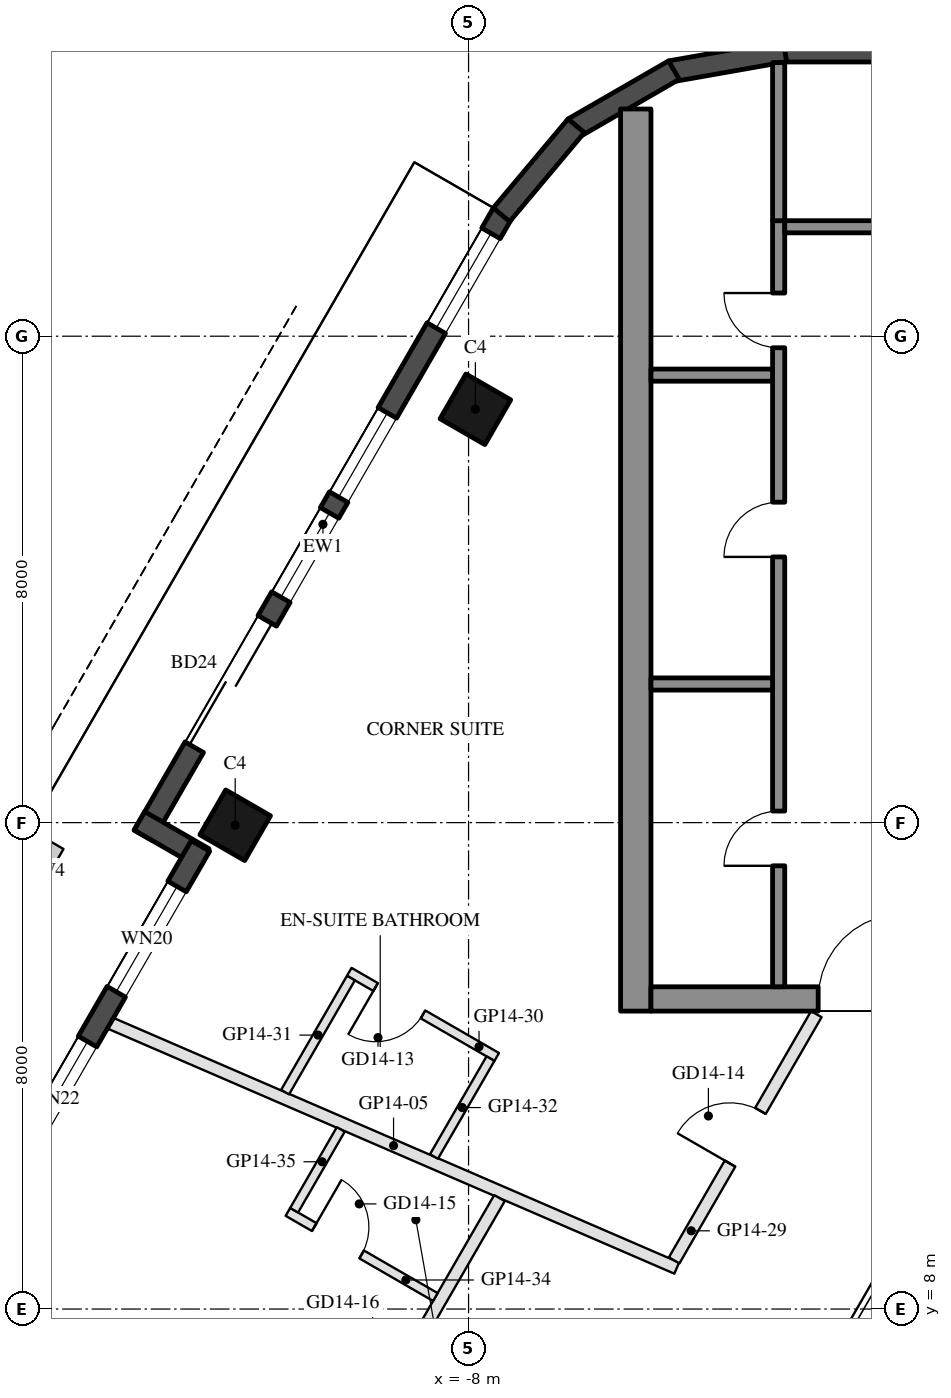
"""IFC4 building model, lengths in metres.
Left out: names, types, materials, properties, quantities, classifications, styles, units other than length and angle.
Written with IfcOpenShell. Run it as: python <this file> out.ifc"""

import sys

from ifc_helpers import new_model, si_unit, direction, frame, frame_2d, origin, origin_2d, place, context, subcontext, project, spatial, rectangle, hollow_rectangle, extrude, element, fill, save


model = new_model("IFC4")
c1 = context("Model", 3, precision=1e-05, world=origin(), true_north=direction((0.0, 1.0)))
c2 = subcontext(c1, "Body", "Model", "MODEL_VIEW")
j1 = project(units=[si_unit("LENGTHUNIT", "METRE"), si_unit("PLANEANGLEUNIT", "RADIAN")], contexts=[c1])
p1 = place(None, origin())
s1 = spatial("IfcSite", under=j1, at=p1, CompositionType="ELEMENT")
p2 = place(p1, origin())
s2 = spatial("IfcBuilding", under=s1, at=p2, CompositionType="ELEMENT")
p3 = place(p2, frame((0.0, 0.0, 165.1)))
s3 = spatial("IfcBuildingStorey", under=s2, at=p3, CompositionType="ELEMENT", Elevation=165.1)
for number, where, z_axis, x_axis in (
    (1, (-7.888, 22.798, 0.0), (0.0, 0.0, 1.0), (0.5, 0.866, 0.0)),
    (2, (-11.838, 15.957, 0.0), (0.0, 0.0, 1.0), (0.5, 0.866, 0.0)),
):
    element("IfcColumn", number, at=place(p3, frame(where, z_axis=z_axis, x_axis=x_axis)), inside=s3, PredefinedType="COLUMN", context=c2, shape_type="SweptSolid", body=[
        extrude(hollow_rectangle(XDim=0.85, YDim=0.85, WallThickness=0.04, at=origin_2d()), origin(), (0.0, 0.0, 1.0), 3.7),
    ])
p4 = place(p3, frame((-7.441, 26.022, 0.0), z_axis=(0.0, 0.0, 1.0), x_axis=(-0.499992533062, -0.86602971478, 0.0)))
e3 = element("IfcWall", 3, at=p4, inside=s3, PredefinedType="SOLIDWALL", context=c2, shape_type="SweptSolid", body=[
    extrude(rectangle(XDim=11.816, YDim=0.35, at=frame_2d((5.908, 0.0))), origin(), (0.0, 0.0, 1.0), 3.55),
])
p5 = place(p4, frame((0.381, 0.0, 0.3)))
e4 = element("IfcOpeningElement", 4, at=p5, cuts=e3, PredefinedType="OPENING", context=c2, shape_type="SweptSolid", body=[
    extrude(rectangle(XDim=1.8, YDim=2.65, at=frame_2d((0.9, 1.325))), frame((0.0, 0.185, 0.0), z_axis=(0.0, -1.0, 0.0), x_axis=(1.0, 0.0, 0.0)), (0.0, 0.0, 1.0), 0.37),
])
p6 = place(p4, frame((7.74, 0.0, 0.0)))
e5 = element("IfcOpeningElement", 5, at=p6, cuts=e3, PredefinedType="OPENING", context=c2, shape_type="SweptSolid", body=[
    extrude(rectangle(XDim=2.4, YDim=2.4, at=frame_2d((1.2, 1.2))), frame((0.0, 0.185, 0.0), z_axis=(0.0, -1.0, 0.0), x_axis=(1.0, 0.0, 0.0)), (0.0, 0.0, 1.0), 0.37),
])
p7 = place(p4, frame((3.791, 0.0, 0.3)))
e6 = element("IfcOpeningElement", 6, at=p7, cuts=e3, PredefinedType="OPENING", context=c2, shape_type="SweptSolid", body=[
    extrude(rectangle(XDim=1.6, YDim=2.65, at=frame_2d((0.8, 1.325))), frame((0.0, 0.185, 0.0), z_axis=(0.0, -1.0, 0.0), x_axis=(1.0, 0.0, 0.0)), (0.0, 0.0, 1.0), 0.37),
])
p8 = place(p4, frame((5.691, 0.0, 0.3)))
e7 = element("IfcOpeningElement", 7, at=p8, cuts=e3, PredefinedType="OPENING", context=c2, shape_type="SweptSolid", body=[
    extrude(rectangle(XDim=1.6, YDim=2.65, at=frame_2d((0.8, 1.325))), frame((0.0, 0.185, 0.0), z_axis=(0.0, -1.0, 0.0), x_axis=(1.0, 0.0, 0.0)), (0.0, 0.0, 1.0), 0.37),
])
p9 = place(p3, frame((-13.413, 16.029, 0.0), z_axis=(0.0, 0.0, 1.0), x_axis=(0.866005645448, -0.500034220881, 0.0)))
e8 = element("IfcWall", 8, at=p9, inside=s3, PredefinedType="SOLIDWALL", context=c2, shape_type="SweptSolid", body=[
    extrude(rectangle(XDim=1.22, YDim=0.35, at=frame_2d((0.61, 0.0))), origin(), (0.0, 0.0, 1.0), 3.55),
])
p10 = place(p3, frame((-12.409, 15.617, 0.0), z_axis=(0.0, 0.0, 1.0), x_axis=(-0.500003597184, -0.866023326939, 0.0)))
e9 = element("IfcWall", 9, at=p10, inside=s3, PredefinedType="SOLIDWALL", context=c2, shape_type="SweptSolid", body=[
    extrude(rectangle(XDim=6.74, YDim=0.35, at=frame_2d((3.37, 0.0))), origin(), (0.0, 0.0, 1.0), 3.55),
])
p11 = place(p10, frame((0.77, 0.0, 0.3)))
e10 = element("IfcOpeningElement", 10, at=p11, cuts=e9, PredefinedType="OPENING", context=c2, shape_type="SweptSolid", body=[
    extrude(rectangle(XDim=2.0, YDim=2.65, at=frame_2d((1.0, 1.325))), frame((0.0, 0.185, 0.0), z_axis=(0.0, -1.0, 0.0), x_axis=(1.0, 0.0, 0.0)), (0.0, 0.0, 1.0), 0.37),
])
p12 = place(p10, frame((3.715, 0.0, 0.3)))
e11 = element("IfcOpeningElement", 11, at=p12, cuts=e9, PredefinedType="OPENING", context=c2, shape_type="SweptSolid", body=[
    extrude(rectangle(XDim=2.2, YDim=2.65, at=frame_2d((1.1, 1.325))), frame((0.0, 0.185, 0.0), z_axis=(0.0, -1.0, 0.0), x_axis=(1.0, 0.0, 0.0)), (0.0, 0.0, 1.0), 0.37),
])
p13 = place(p3, frame((2.829, 28.685, 0.0), z_axis=(0.0, 0.0, 1.0), x_axis=(-1.0, 0.0, 0.0)))
e12 = element("IfcWall", 12, at=p13, inside=s3, PredefinedType="SOLIDWALL", context=c2, shape_type="SweptSolid", body=[
    extrude(rectangle(XDim=5.658, YDim=0.35, at=frame_2d((2.829, 0.0))), origin(), (0.0, 0.0, 1.0), 3.55),
])
for number, where, z_axis, x_axis in (
    (13, (-2.799, 28.688, 0.0), (0.0, 0.0, 1.0), (-0.985, -0.174, 0.0)),
    (14, (-4.623, 28.377, 0.0), (0.0, 0.0, 1.0), (-0.866, -0.5, 0.0)),
):
    element("IfcWall", number, at=place(p3, frame(where, z_axis=z_axis, x_axis=x_axis)), inside=s3, PredefinedType="SOLIDWALL", context=c2, shape_type="SweptSolid", body=[
        extrude(rectangle(XDim=1.91, YDim=0.35, at=frame_2d((0.955, 0.0))), origin(), (0.0, 0.0, 1.0), 3.55),
    ])
p14 = place(p3, frame((-6.23, 27.461, 0.0), z_axis=(0.0, 0.0, 1.0), x_axis=(-0.642808304945, -0.766027077259, 0.0)))
e15 = element("IfcWall", 15, at=p14, inside=s3, PredefinedType="SOLIDWALL", context=c2, shape_type="SweptSolid", body=[
    extrude(rectangle(XDim=1.91, YDim=0.35, at=frame_2d((0.955, 0.0))), origin(), (0.0, 0.0, 1.0), 3.55),
])
p15 = place(p3, frame((-5.25, 12.9, 0.0), z_axis=(0.0, 0.0, 1.0), x_axis=(0.0, 1.0, 0.0)))
e16 = element("IfcWall", 16, at=p15, inside=s3, PredefinedType="SHEAR", context=c2, shape_type="SweptSolid", body=[
    extrude(rectangle(XDim=14.837, YDim=0.5, at=frame_2d((7.418, 0.0))), origin(), (0.0, 0.0, 1.0), 3.5),
])
p16 = place(p3, frame((5.0, 13.1, 0.0), z_axis=(0.0, 0.0, 1.0), x_axis=(-1.0, 0.0, 0.0)))
e17 = element("IfcWall", 17, at=p16, inside=s3, PredefinedType="SHEAR", context=c2, shape_type="SweptSolid", body=[
    extrude(rectangle(XDim=10.0, YDim=0.4, at=frame_2d((5.0, 0.0))), origin(), (0.0, 0.0, 1.0), 3.5),
])
p17 = place(p16, frame((3.55, 0.0, 0.0)))
e18 = element("IfcOpeningElement", 18, at=p17, cuts=e17, PredefinedType="OPENING", context=c2, shape_type="SweptSolid", body=[
    extrude(rectangle(XDim=1.1, YDim=2.1, at=frame_2d((0.55, 1.05))), frame((0.0, 0.21, 0.0), z_axis=(0.0, -1.0, 0.0), x_axis=(1.0, 0.0, 0.0)), (0.0, 0.0, 1.0), 0.42),
])
p18 = place(p16, frame((5.85, 0.0, 0.0)))
e19 = element("IfcOpeningElement", 19, at=p18, cuts=e17, PredefinedType="OPENING", context=c2, shape_type="SweptSolid", body=[
    extrude(rectangle(XDim=1.4, YDim=2.1, at=frame_2d((0.7, 1.05))), frame((0.0, 0.21, 0.0), z_axis=(0.0, -1.0, 0.0), x_axis=(1.0, 0.0, 0.0)), (0.0, 0.0, 1.0), 0.42),
])
p19 = place(p3, frame((-2.9, 13.3, 0.0), z_axis=(0.0, 0.0, 1.0), x_axis=(0.0, 1.0, 0.0)))
e20 = element("IfcWall", 20, at=p19, inside=s3, PredefinedType="SHEAR", context=c2, shape_type="SweptSolid", body=[
    extrude(rectangle(XDim=12.6, YDim=0.2, at=frame_2d((6.3, 0.0))), origin(), (0.0, 0.0, 1.0), 3.5),
])
p20 = place(p19, frame((1.99, 0.0, 0.0)))
e21 = element("IfcOpeningElement", 21, at=p20, cuts=e20, PredefinedType="OPENING", context=c2, shape_type="SweptSolid", body=[
    extrude(rectangle(XDim=0.9, YDim=2.1, at=frame_2d((0.45, 1.05))), frame((0.0, 0.11, 0.0), z_axis=(0.0, -1.0, 0.0), x_axis=(1.0, 0.0, 0.0)), (0.0, 0.0, 1.0), 0.22),
])
p21 = place(p19, frame((7.07, 0.0, 0.0)))
e22 = element("IfcOpeningElement", 22, at=p21, cuts=e20, PredefinedType="OPENING", context=c2, shape_type="SweptSolid", body=[
    extrude(rectangle(XDim=0.9, YDim=2.1, at=frame_2d((0.45, 1.05))), frame((0.0, 0.11, 0.0), z_axis=(0.0, -1.0, 0.0), x_axis=(1.0, 0.0, 0.0)), (0.0, 0.0, 1.0), 0.22),
])
p22 = place(p19, frame((10.51, 0.0, 0.0)))
e23 = element("IfcOpeningElement", 23, at=p22, cuts=e20, PredefinedType="OPENING", context=c2, shape_type="SweptSolid", body=[
    extrude(rectangle(XDim=0.9, YDim=2.1, at=frame_2d((0.45, 1.05))), frame((0.0, 0.11, 0.0), z_axis=(0.0, -1.0, 0.0), x_axis=(1.0, 0.0, 0.0)), (0.0, 0.0, 1.0), 0.22),
])
p23 = place(p3, frame((-0.4, 25.8, 0.0), z_axis=(0.0, 0.0, 1.0), x_axis=(-1.0, 0.0, 0.0)))
e24 = element("IfcWall", 24, at=p23, inside=s3, PredefinedType="SHEAR", context=c2, shape_type="SweptSolid", body=[
    extrude(rectangle(XDim=2.4, YDim=0.2, at=frame_2d((1.2, 0.0))), origin(), (0.0, 0.0, 1.0), 3.5),
])
for number, where, z_axis, x_axis in (
    (25, (-3.0, 18.28, 0.0), (0.0, 0.0, 1.0), (-1.0, 0.0, 0.0)),
    (26, (-3.0, 23.36, 0.0), (0.0, 0.0, 1.0), (-1.0, 0.0, 0.0)),
):
    element("IfcWall", number, at=place(p3, frame(where, z_axis=z_axis, x_axis=x_axis)), inside=s3, PredefinedType="SHEAR", context=c2, shape_type="SweptSolid", body=[
        extrude(rectangle(XDim=2.0, YDim=0.2, at=frame_2d((1.0, 0.0))), origin(), (0.0, 0.0, 1.0), 3.5),
    ])
p24 = place(p3, frame((-2.9, 25.9, 0.0), z_axis=(0.0, 0.0, 1.0), x_axis=(0.0, 1.0, 0.0)))
e27 = element("IfcWall", 27, at=p24, inside=s3, PredefinedType="SHEAR", context=c2, shape_type="SweptSolid", body=[
    extrude(rectangle(XDim=2.6, YDim=0.2, at=frame_2d((1.3, 0.0))), origin(), (0.0, 0.0, 1.0), 3.5),
])
p25 = place(p3, frame((-13.89, 12.701, 0.0), z_axis=(0.0, 0.0, 1.0), x_axis=(0.917850876745, -0.396925393566, 0.0)))
e28 = element("IfcWall", 28, at=p25, inside=s3, PredefinedType="PARTITIONING", context=c2, shape_type="SweptSolid", body=[
    extrude(rectangle(XDim=10.147, YDim=0.2, at=frame_2d((5.074, 0.0))), origin(), (0.0, 0.0, 1.0), 2.95),
])
p26 = place(p3, frame((-4.618, 8.801, 0.0), z_axis=(0.0, 0.0, 1.0), x_axis=(0.499980071345, 0.866036909293, 0.0)))
e29 = element("IfcWall", 29, at=p26, inside=s3, PredefinedType="PARTITIONING", context=c2, shape_type="SweptSolid", body=[
    extrude(rectangle(XDim=4.676, YDim=0.2, at=frame_2d((2.338, 0.0))), origin(), (0.0, 0.0, 1.0), 2.95),
])
p27 = place(p26, frame((1.838, 0.0, 0.0)))
e30 = element("IfcOpeningElement", 30, at=p27, cuts=e29, PredefinedType="OPENING", context=c2, shape_type="SweptSolid", body=[
    extrude(rectangle(XDim=1.0, YDim=2.1, at=frame_2d((0.5, 1.05))), frame((0.0, 0.11, 0.0), z_axis=(0.0, -1.0, 0.0), x_axis=(1.0, 0.0, 0.0)), (0.0, 0.0, 1.0), 0.22),
])
p28 = place(p3, frame((-7.537, 12.146, 0.0), z_axis=(0.0, 0.0, 1.0), x_axis=(-0.866034573852, 0.49998411664, 0.0)))
e31 = element("IfcWall", 31, at=p28, inside=s3, PredefinedType="PARTITIONING", context=c2, shape_type="SweptSolid", body=[
    extrude(rectangle(XDim=2.8, YDim=0.15, at=frame_2d((1.4, 0.0))), origin(), (0.0, 0.0, 1.0), 3.55),
])
p29 = place(p28, frame((1.4, 0.0, 0.0)))
e32 = element("IfcOpeningElement", 32, at=p29, cuts=e31, PredefinedType="OPENING", context=c2, shape_type="SweptSolid", body=[
    extrude(rectangle(XDim=0.9, YDim=2.1, at=frame_2d((0.45, 1.05))), frame((0.0, 0.085, 0.0), z_axis=(0.0, -1.0, 0.0), x_axis=(1.0, 0.0, 0.0)), (0.0, 0.0, 1.0), 0.17),
])
p30 = place(p3, frame((-9.934, 13.443, 0.0), z_axis=(0.0, 0.0, 1.0), x_axis=(-0.500018419339, -0.866014769113, 0.0)))
e33 = element("IfcWall", 33, at=p30, inside=s3, PredefinedType="PARTITIONING", context=c2, shape_type="SweptSolid", body=[
    extrude(rectangle(XDim=2.166, YDim=0.15, at=frame_2d((1.083, 0.0))), origin(), (0.0, 0.0, 1.0), 3.55),
])
p31 = place(p3, frame((-7.639, 12.118, 0.0), z_axis=(0.0, 0.0, 1.0), x_axis=(-0.500052179009, -0.865995276124, 0.0)))
e34 = element("IfcWall", 34, at=p31, inside=s3, PredefinedType="PARTITIONING", context=c2, shape_type="SweptSolid", body=[
    extrude(rectangle(XDim=1.859, YDim=0.15, at=frame_2d((0.929, 0.0))), origin(), (0.0, 0.0, 1.0), 3.55),
])
p32 = place(p3, frame((-12.823, 0.591, 0.0), z_axis=(0.0, 0.0, 1.0), x_axis=(0.500005210312, 0.866022395588, 0.0)))
e35 = element("IfcWall", 35, at=p32, inside=s3, PredefinedType="PARTITIONING", context=c2, shape_type="SweptSolid", body=[
    extrude(rectangle(XDim=10.663, YDim=0.2, at=frame_2d((5.332, 0.0))), origin(), (0.0, 0.0, 1.0), 2.95),
])
p33 = place(p32, frame((7.201, 0.0, 0.0)))
e36 = element("IfcOpeningElement", 36, at=p33, cuts=e35, PredefinedType="OPENING", context=c2, shape_type="SweptSolid", body=[
    extrude(rectangle(XDim=1.0, YDim=2.1, at=frame_2d((0.5, 1.05))), frame((0.0, 0.11, 0.0), z_axis=(0.0, -1.0, 0.0), x_axis=(1.0, 0.0, 0.0)), (0.0, 0.0, 1.0), 0.22),
])
p34 = place(p3, frame((-10.971, 9.598, 0.0), z_axis=(0.0, 0.0, 1.0), x_axis=(0.865996816683, -0.500049511043, 0.0)))
e37 = element("IfcWall", 37, at=p34, inside=s3, PredefinedType="PARTITIONING", context=c2, shape_type="SweptSolid", body=[
    extrude(rectangle(XDim=2.8, YDim=0.15, at=frame_2d((1.4, 0.0))), origin(), (0.0, 0.0, 1.0), 3.55),
])
p35 = place(p34, frame((0.5, 0.0, 0.0)))
e38 = element("IfcOpeningElement", 38, at=p35, cuts=e37, PredefinedType="OPENING", context=c2, shape_type="SweptSolid", body=[
    extrude(rectangle(XDim=0.9, YDim=2.1, at=frame_2d((0.45, 1.05))), frame((0.0, 0.085, 0.0), z_axis=(0.0, -1.0, 0.0), x_axis=(1.0, 0.0, 0.0)), (0.0, 0.0, 1.0), 0.17),
])
p36 = place(p3, frame((-10.102, 10.954, 0.0), z_axis=(0.0, 0.0, 1.0), x_axis=(-0.499956687145, -0.866050409029, 0.0)))
e39 = element("IfcWall", 39, at=p36, inside=s3, PredefinedType="PARTITIONING", context=c2, shape_type="SweptSolid", body=[
    extrude(rectangle(XDim=1.534, YDim=0.15, at=frame_2d((0.767, 0.0))), origin(), (0.0, 0.0, 1.0), 2.95),
])
p37 = place(p5, origin())
e40 = element("IfcWindow", 40, at=p37, inside=s3, PartitioningType="SINGLE_PANEL", PredefinedType="WINDOW", context=c2, shape_type="SweptSolid", body=[
    extrude(rectangle(XDim=1.8, YDim=2.65, at=frame_2d((0.9, 1.325))), frame((0.0, 0.03, 0.0), z_axis=(0.0, -1.0, 0.0), x_axis=(1.0, 0.0, 0.0)), (0.0, 0.0, 1.0), 0.06),
])
fill(e4, e40)
p38 = place(p6, frame((2.4, 0.0, 0.0), z_axis=(0.0, 0.0, 1.0), x_axis=(-1.0, 0.0, 0.0)))
e41 = element("IfcDoor", 41, at=p38, inside=s3, OperationType="SLIDING_TO_LEFT", PredefinedType="DOOR", context=c2, shape_type="SweptSolid", body=[
    extrude(rectangle(XDim=2.4, YDim=2.4, at=frame_2d((1.2, 1.2))), frame((0.0, 0.025, 0.0), z_axis=(0.0, -1.0, 0.0), x_axis=(1.0, 0.0, 0.0)), (0.0, 0.0, 1.0), 0.05),
])
fill(e5, e41)
p39 = place(p7, origin())
e42 = element("IfcWindow", 42, at=p39, inside=s3, PartitioningType="SINGLE_PANEL", PredefinedType="WINDOW", context=c2, shape_type="SweptSolid", body=[
    extrude(rectangle(XDim=1.6, YDim=2.65, at=frame_2d((0.8, 1.325))), frame((0.0, 0.03, 0.0), z_axis=(0.0, -1.0, 0.0), x_axis=(1.0, 0.0, 0.0)), (0.0, 0.0, 1.0), 0.06),
])
fill(e6, e42)
p40 = place(p8, origin())
e43 = element("IfcWindow", 43, at=p40, inside=s3, PartitioningType="SINGLE_PANEL", PredefinedType="WINDOW", context=c2, shape_type="SweptSolid", body=[
    extrude(rectangle(XDim=1.6, YDim=2.65, at=frame_2d((0.8, 1.325))), frame((0.0, 0.03, 0.0), z_axis=(0.0, -1.0, 0.0), x_axis=(1.0, 0.0, 0.0)), (0.0, 0.0, 1.0), 0.06),
])
fill(e7, e43)
p41 = place(p11, origin())
e44 = element("IfcWindow", 44, at=p41, inside=s3, PartitioningType="SINGLE_PANEL", PredefinedType="WINDOW", context=c2, shape_type="SweptSolid", body=[
    extrude(rectangle(XDim=2.0, YDim=2.65, at=frame_2d((1.0, 1.325))), frame((0.0, 0.03, 0.0), z_axis=(0.0, -1.0, 0.0), x_axis=(1.0, 0.0, 0.0)), (0.0, 0.0, 1.0), 0.06),
])
fill(e10, e44)
p42 = place(p12, origin())
e45 = element("IfcWindow", 45, at=p42, inside=s3, PartitioningType="SINGLE_PANEL", PredefinedType="WINDOW", context=c2, shape_type="SweptSolid", body=[
    extrude(rectangle(XDim=2.2, YDim=2.65, at=frame_2d((1.1, 1.325))), frame((0.0, 0.03, 0.0), z_axis=(0.0, -1.0, 0.0), x_axis=(1.0, 0.0, 0.0)), (0.0, 0.0, 1.0), 0.06),
])
fill(e11, e45)
p43 = place(p20, origin())
e46 = element("IfcDoor", 46, at=p43, inside=s3, OperationType="SINGLE_SWING_LEFT", PredefinedType="DOOR", context=c2, shape_type="SweptSolid", body=[
    extrude(rectangle(XDim=0.9, YDim=2.1, at=frame_2d((0.45, 1.05))), frame((0.0, 0.025, 0.0), z_axis=(0.0, -1.0, 0.0), x_axis=(1.0, 0.0, 0.0)), (0.0, 0.0, 1.0), 0.05),
])
fill(e21, e46)
p44 = place(p21, origin())
e47 = element("IfcDoor", 47, at=p44, inside=s3, OperationType="SINGLE_SWING_LEFT", PredefinedType="DOOR", context=c2, shape_type="SweptSolid", body=[
    extrude(rectangle(XDim=0.9, YDim=2.1, at=frame_2d((0.45, 1.05))), frame((0.0, 0.025, 0.0), z_axis=(0.0, -1.0, 0.0), x_axis=(1.0, 0.0, 0.0)), (0.0, 0.0, 1.0), 0.05),
])
fill(e22, e47)
p45 = place(p22, origin())
e48 = element("IfcDoor", 48, at=p45, inside=s3, OperationType="SINGLE_SWING_RIGHT", PredefinedType="DOOR", context=c2, shape_type="SweptSolid", body=[
    extrude(rectangle(XDim=0.9, YDim=2.1, at=frame_2d((0.45, 1.05))), frame((0.0, 0.025, 0.0), z_axis=(0.0, -1.0, 0.0), x_axis=(1.0, 0.0, 0.0)), (0.0, 0.0, 1.0), 0.05),
])
fill(e23, e48)
p46 = place(p18, frame((1.4, 0.0, 0.0), z_axis=(0.0, 0.0, 1.0), x_axis=(-1.0, 0.0, 0.0)))
e49 = element("IfcDoor", 49, at=p46, inside=s3, OperationType="DOUBLE_DOOR_SINGLE_SWING", PredefinedType="DOOR", context=c2, shape_type="SweptSolid", body=[
    extrude(rectangle(XDim=1.4, YDim=2.1, at=frame_2d((0.7, 1.05))), frame((0.0, 0.025, 0.0), z_axis=(0.0, -1.0, 0.0), x_axis=(1.0, 0.0, 0.0)), (0.0, 0.0, 1.0), 0.05),
])
fill(e19, e49)
p47 = place(p29, origin())
e50 = element("IfcDoor", 50, at=p47, inside=s3, OperationType="SINGLE_SWING_RIGHT", PredefinedType="DOOR", context=c2, shape_type="SweptSolid", body=[
    extrude(rectangle(XDim=0.9, YDim=2.1, at=frame_2d((0.45, 1.05))), frame((0.0, 0.025, 0.0), z_axis=(0.0, -1.0, 0.0), x_axis=(1.0, 0.0, 0.0)), (0.0, 0.0, 1.0), 0.05),
])
fill(e32, e50)
p48 = place(p27, origin())
e51 = element("IfcDoor", 51, at=p48, inside=s3, OperationType="SINGLE_SWING_LEFT", PredefinedType="DOOR", context=c2, shape_type="SweptSolid", body=[
    extrude(rectangle(XDim=1.0, YDim=2.1, at=frame_2d((0.5, 1.05))), frame((0.0, 0.025, 0.0), z_axis=(0.0, -1.0, 0.0), x_axis=(1.0, 0.0, 0.0)), (0.0, 0.0, 1.0), 0.05),
])
fill(e30, e51)
p49 = place(p35, origin())
e52 = element("IfcDoor", 52, at=p49, inside=s3, OperationType="SINGLE_SWING_LEFT", PredefinedType="DOOR", context=c2, shape_type="SweptSolid", body=[
    extrude(rectangle(XDim=0.9, YDim=2.1, at=frame_2d((0.45, 1.05))), frame((0.0, 0.025, 0.0), z_axis=(0.0, -1.0, 0.0), x_axis=(1.0, 0.0, 0.0)), (0.0, 0.0, 1.0), 0.05),
])
fill(e38, e52)
save(model, sys.argv[1])
